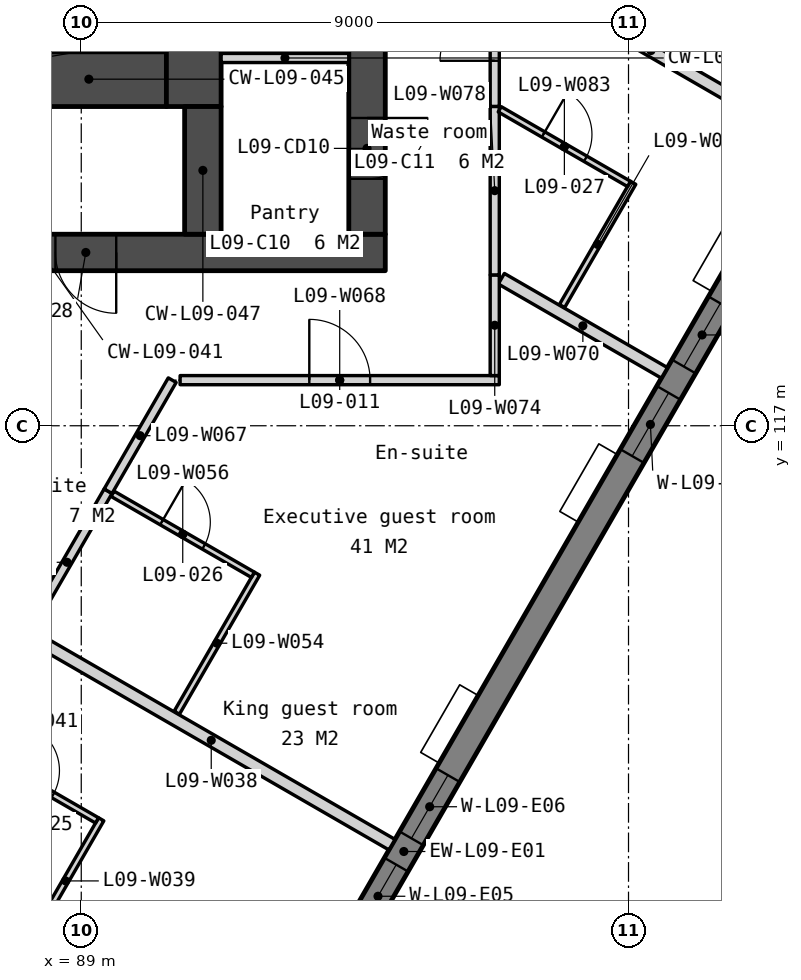
"""IFC4 building model, lengths in metres.
Left out: names, types, materials, properties, quantities, classifications, styles, units other than length and angle.
Written with IfcOpenShell. Run it as: python <this file> out.ifc"""

import sys

from ifc_helpers import new_model, si_unit, direction, frame, frame_2d, origin, place, context, subcontext, project, spatial, polyline, rectangle, outline, extrude, element, fill, save


model = new_model("IFC4")
c1 = context("Model", 3, precision=1e-05, world=origin(), true_north=direction((0.0, 1.0)))
c2 = subcontext(c1, "Body", "Model", "MODEL_VIEW")
j1 = project(units=[si_unit("LENGTHUNIT", "METRE"), si_unit("PLANEANGLEUNIT", "RADIAN")], contexts=[c1])
p1 = place(None, origin())
s1 = spatial("IfcSite", under=j1, at=p1, CompositionType="ELEMENT")
p2 = place(p1, origin())
s2 = spatial("IfcBuilding", under=s1, at=p2, CompositionType="ELEMENT")
p3 = place(p2, frame((0.0, 0.0, 45.5)))
s3 = spatial("IfcBuildingStorey", under=s2, at=p3, CompositionType="ELEMENT", Elevation=45.5)
p4 = place(p3, frame((66.0, 119.85, 0.0), z_axis=(0.0, 0.0, 1.0), x_axis=(1.0, 0.0, 0.0)))
e1 = element("IfcWall", 1, at=p4, inside=s3, PredefinedType="SOLIDWALL", context=c2, shape_type="SweptSolid", body=[
    extrude(rectangle(XDim=28.0, YDim=0.6, at=frame_2d((14.0, 0.0))), origin(), (0.0, 0.0, 1.0), 3.35),
])
p5 = place(p4, frame((6.825, 0.0, 0.0)))
e2 = element("IfcOpeningElement", 2, at=p5, cuts=e1, PredefinedType="OPENING", context=c2, shape_type="SweptSolid", body=[
    extrude(rectangle(XDim=1.8, YDim=2.1, at=frame_2d((0.9, 1.05))), frame((0.0, 0.31, 0.0), z_axis=(0.0, -1.0, 0.0), x_axis=(1.0, 0.0, 0.0)), (0.0, 0.0, 1.0), 0.62),
])
p6 = place(p4, frame((15.85, 0.0, 0.0)))
e3 = element("IfcOpeningElement", 3, at=p6, cuts=e1, PredefinedType="OPENING", context=c2, shape_type="SweptSolid", body=[
    extrude(rectangle(XDim=1.5, YDim=2.1, at=frame_2d((0.75, 1.05))), frame((0.0, 0.31, 0.0), z_axis=(0.0, -1.0, 0.0), x_axis=(1.0, 0.0, 0.0)), (0.0, 0.0, 1.0), 0.62),
])
p7 = place(p4, frame((19.375, 0.0, 0.0)))
e4 = element("IfcOpeningElement", 4, at=p7, cuts=e1, PredefinedType="OPENING", context=c2, shape_type="SweptSolid", body=[
    extrude(rectangle(XDim=1.8, YDim=2.1, at=frame_2d((0.9, 1.05))), frame((0.0, 0.31, 0.0), z_axis=(0.0, -1.0, 0.0), x_axis=(1.0, 0.0, 0.0)), (0.0, 0.0, 1.0), 0.62),
])
p8 = place(p4, frame((4.425, 0.0, 0.0)))
e5 = element("IfcOpeningElement", 5, at=p8, cuts=e1, PredefinedType="OPENING", context=c2, shape_type="SweptSolid", body=[
    extrude(rectangle(XDim=1.0, YDim=2.1, at=frame_2d((0.5, 1.05))), frame((0.0, 0.31, 0.0), z_axis=(0.0, -1.0, 0.0), x_axis=(1.0, 0.0, 0.0)), (0.0, 0.0, 1.0), 0.62),
])
p9 = place(p4, frame((9.783, 0.0, 0.0)))
e6 = element("IfcOpeningElement", 6, at=p9, cuts=e1, PredefinedType="OPENING", context=c2, shape_type="SweptSolid", body=[
    extrude(rectangle(XDim=1.0, YDim=2.1, at=frame_2d((0.5, 1.05))), frame((0.0, 0.31, 0.0), z_axis=(0.0, -1.0, 0.0), x_axis=(1.0, 0.0, 0.0)), (0.0, 0.0, 1.0), 0.62),
])
p10 = place(p4, frame((11.525, 0.0, 0.0)))
e7 = element("IfcOpeningElement", 7, at=p10, cuts=e1, PredefinedType="OPENING", context=c2, shape_type="SweptSolid", body=[
    extrude(rectangle(XDim=1.0, YDim=2.1, at=frame_2d((0.5, 1.05))), frame((0.0, 0.31, 0.0), z_axis=(0.0, -1.0, 0.0), x_axis=(1.0, 0.0, 0.0)), (0.0, 0.0, 1.0), 0.62),
])
p11 = place(p4, frame((13.658, 0.0, 0.0)))
e8 = element("IfcOpeningElement", 8, at=p11, cuts=e1, PredefinedType="OPENING", context=c2, shape_type="SweptSolid", body=[
    extrude(rectangle(XDim=1.0, YDim=2.1, at=frame_2d((0.5, 1.05))), frame((0.0, 0.31, 0.0), z_axis=(0.0, -1.0, 0.0), x_axis=(1.0, 0.0, 0.0)), (0.0, 0.0, 1.0), 0.62),
])
p12 = place(p4, frame((22.575, 0.0, 0.0)))
e9 = element("IfcOpeningElement", 9, at=p12, cuts=e1, PredefinedType="OPENING", context=c2, shape_type="SweptSolid", body=[
    extrude(rectangle(XDim=1.0, YDim=2.1, at=frame_2d((0.5, 1.05))), frame((0.0, 0.31, 0.0), z_axis=(0.0, -1.0, 0.0), x_axis=(1.0, 0.0, 0.0)), (0.0, 0.0, 1.0), 0.62),
])
p13 = place(p3, frame((87.85, 122.7, 0.0), z_axis=(0.0, 0.0, 1.0), x_axis=(1.0, 0.0, 0.0)))
e10 = element("IfcWall", 10, at=p13, inside=s3, PredefinedType="SOLIDWALL", context=c2, shape_type="SweptSolid", body=[
    extrude(rectangle(XDim=2.55, YDim=0.9, at=frame_2d((1.275, 0.0))), origin(), (0.0, 0.0, 1.0), 3.35),
])
p14 = place(p3, frame((90.85, 133.95, 0.0), z_axis=(0.0, 0.0, 1.0), x_axis=(0.0, -1.0, 0.0)))
e11 = element("IfcWall", 11, at=p14, inside=s3, PredefinedType="SOLIDWALL", context=c2, shape_type="SweptSolid", body=[
    extrude(rectangle(XDim=11.7, YDim=0.9, at=frame_2d((5.85, 0.0))), origin(), (0.0, 0.0, 1.0), 3.35),
])
p15 = place(p3, frame((91.0, 122.25, 0.0), z_axis=(0.0, 0.0, 1.0), x_axis=(0.0, -1.0, 0.0)))
e12 = element("IfcWall", 12, at=p15, inside=s3, PredefinedType="SOLIDWALL", context=c2, shape_type="SweptSolid", body=[
    extrude(rectangle(XDim=2.1, YDim=0.6, at=frame_2d((1.05, 0.0))), origin(), (0.0, 0.0, 1.0), 3.35),
])
p16 = place(p3, frame((91.3, 123.049, 0.0), z_axis=(0.0, 0.0, 1.0), x_axis=(1.0, 0.0, 0.0)))
e13 = element("IfcWall", 13, at=p16, inside=s3, PredefinedType="PARTITIONING", context=c2, shape_type="SweptSolid", body=[
    extrude(rectangle(XDim=2.1, YDim=0.15, at=frame_2d((1.05, 0.0))), origin(), (0.0, 0.0, 1.0), 3.35),
])
p17 = place(p3, frame((93.7, 133.95, 0.0), z_axis=(0.0, 0.0, 1.0), x_axis=(0.0, -1.0, 0.0)))
e14 = element("IfcWall", 14, at=p17, inside=s3, PredefinedType="SOLIDWALL", context=c2, shape_type="SweptSolid", body=[
    extrude(rectangle(XDim=13.8, YDim=0.6, at=frame_2d((6.9, 0.0))), origin(), (0.0, 0.0, 1.0), 3.35),
])
p18 = place(p17, frame((0.6, 0.0, 0.0)))
e15 = element("IfcOpeningElement", 15, at=p18, cuts=e14, PredefinedType="OPENING", context=c2, shape_type="SweptSolid", body=[
    extrude(rectangle(XDim=1.1, YDim=2.1, at=frame_2d((0.55, 1.05))), frame((0.0, 0.31, 0.0), z_axis=(0.0, -1.0, 0.0), x_axis=(1.0, 0.0, 0.0)), (0.0, 0.0, 1.0), 0.62),
])
p19 = place(p17, frame((8.963, 0.0, 0.0)))
e16 = element("IfcOpeningElement", 16, at=p19, cuts=e14, PredefinedType="OPENING", context=c2, shape_type="SweptSolid", body=[
    extrude(rectangle(XDim=1.0, YDim=2.1, at=frame_2d((0.5, 1.05))), frame((0.0, 0.31, 0.0), z_axis=(0.0, -1.0, 0.0), x_axis=(1.0, 0.0, 0.0)), (0.0, 0.0, 1.0), 0.62),
])
p20 = place(p17, frame((11.888, 0.0, 0.0)))
e17 = element("IfcOpeningElement", 17, at=p20, cuts=e14, PredefinedType="OPENING", context=c2, shape_type="SweptSolid", body=[
    extrude(rectangle(XDim=1.0, YDim=2.1, at=frame_2d((0.5, 1.05))), frame((0.0, 0.31, 0.0), z_axis=(0.0, -1.0, 0.0), x_axis=(1.0, 0.0, 0.0)), (0.0, 0.0, 1.0), 0.62),
])
p21 = place(p3, frame((83.105, 90.599, -0.15), z_axis=(0.0, 0.0, 1.0), x_axis=(0.499999201451, 0.866025864826, 0.0)))
e18 = element("IfcWall", 18, at=p21, inside=s3, PredefinedType="SOLIDWALL", context=c2, shape_type="SweptSolid", body=[
    extrude(outline(polyline([(44.8, 0.0), (44.8, 3.5), (0.0, 3.5), (0.0, 0.0), (44.8, 0.0)])), frame((0.0, 0.225, 0.0), z_axis=(0.0, -1.0, 0.0), x_axis=(1.0, 0.0, 0.0)), (0.0, 0.0, 1.0), 0.45),
])
p22 = place(p21, frame((3.03, 0.0, 1.05)))
e19 = element("IfcOpeningElement", 19, at=p22, cuts=e18, PredefinedType="OPENING", context=c2, shape_type="SweptSolid", body=[
    extrude(rectangle(XDim=1.2, YDim=1.5, at=frame_2d((0.6, 0.75))), frame((0.0, 0.235, 0.0), z_axis=(0.0, -1.0, 0.0), x_axis=(1.0, 0.0, 0.0)), (0.0, 0.0, 1.0), 0.47),
])
p23 = place(p21, frame((4.73, 0.0, 1.05)))
e20 = element("IfcOpeningElement", 20, at=p23, cuts=e18, PredefinedType="OPENING", context=c2, shape_type="SweptSolid", body=[
    extrude(rectangle(XDim=1.2, YDim=1.5, at=frame_2d((0.6, 0.75))), frame((0.0, 0.235, 0.0), z_axis=(0.0, -1.0, 0.0), x_axis=(1.0, 0.0, 0.0)), (0.0, 0.0, 1.0), 0.47),
])
p24 = place(p21, frame((11.99, 0.0, 1.05)))
e21 = element("IfcOpeningElement", 21, at=p24, cuts=e18, PredefinedType="OPENING", context=c2, shape_type="SweptSolid", body=[
    extrude(rectangle(XDim=1.2, YDim=1.5, at=frame_2d((0.6, 0.75))), frame((0.0, 0.235, 0.0), z_axis=(0.0, -1.0, 0.0), x_axis=(1.0, 0.0, 0.0)), (0.0, 0.0, 1.0), 0.47),
])
p25 = place(p21, frame((13.69, 0.0, 1.05)))
e22 = element("IfcOpeningElement", 22, at=p25, cuts=e18, PredefinedType="OPENING", context=c2, shape_type="SweptSolid", body=[
    extrude(rectangle(XDim=1.2, YDim=1.5, at=frame_2d((0.6, 0.75))), frame((0.0, 0.235, 0.0), z_axis=(0.0, -1.0, 0.0), x_axis=(1.0, 0.0, 0.0)), (0.0, 0.0, 1.0), 0.47),
])
p26 = place(p21, frame((20.95, 0.0, 1.05)))
e23 = element("IfcOpeningElement", 23, at=p26, cuts=e18, PredefinedType="OPENING", context=c2, shape_type="SweptSolid", body=[
    extrude(rectangle(XDim=1.2, YDim=1.5, at=frame_2d((0.6, 0.75))), frame((0.0, 0.235, 0.0), z_axis=(0.0, -1.0, 0.0), x_axis=(1.0, 0.0, 0.0)), (0.0, 0.0, 1.0), 0.47),
])
p27 = place(p21, frame((22.65, 0.0, 1.05)))
e24 = element("IfcOpeningElement", 24, at=p27, cuts=e18, PredefinedType="OPENING", context=c2, shape_type="SweptSolid", body=[
    extrude(rectangle(XDim=1.2, YDim=1.5, at=frame_2d((0.6, 0.75))), frame((0.0, 0.235, 0.0), z_axis=(0.0, -1.0, 0.0), x_axis=(1.0, 0.0, 0.0)), (0.0, 0.0, 1.0), 0.47),
])
p28 = place(p21, frame((29.91, 0.0, 1.05)))
e25 = element("IfcOpeningElement", 25, at=p28, cuts=e18, PredefinedType="OPENING", context=c2, shape_type="SweptSolid", body=[
    extrude(rectangle(XDim=1.2, YDim=1.5, at=frame_2d((0.6, 0.75))), frame((0.0, 0.235, 0.0), z_axis=(0.0, -1.0, 0.0), x_axis=(1.0, 0.0, 0.0)), (0.0, 0.0, 1.0), 0.47),
])
p29 = place(p21, frame((31.61, 0.0, 1.05)))
e26 = element("IfcOpeningElement", 26, at=p29, cuts=e18, PredefinedType="OPENING", context=c2, shape_type="SweptSolid", body=[
    extrude(rectangle(XDim=1.2, YDim=1.5, at=frame_2d((0.6, 0.75))), frame((0.0, 0.235, 0.0), z_axis=(0.0, -1.0, 0.0), x_axis=(1.0, 0.0, 0.0)), (0.0, 0.0, 1.0), 0.47),
])
p30 = place(p21, frame((38.87, 0.0, 1.05)))
e27 = element("IfcOpeningElement", 27, at=p30, cuts=e18, PredefinedType="OPENING", context=c2, shape_type="SweptSolid", body=[
    extrude(rectangle(XDim=1.2, YDim=1.5, at=frame_2d((0.6, 0.75))), frame((0.0, 0.235, 0.0), z_axis=(0.0, -1.0, 0.0), x_axis=(1.0, 0.0, 0.0)), (0.0, 0.0, 1.0), 0.47),
])
p31 = place(p21, frame((40.57, 0.0, 1.05)))
e28 = element("IfcOpeningElement", 28, at=p31, cuts=e18, PredefinedType="OPENING", context=c2, shape_type="SweptSolid", body=[
    extrude(rectangle(XDim=1.2, YDim=1.5, at=frame_2d((0.6, 0.75))), frame((0.0, 0.235, 0.0), z_axis=(0.0, -1.0, 0.0), x_axis=(1.0, 0.0, 0.0)), (0.0, 0.0, 1.0), 0.47),
])
p32 = place(p3, frame((88.165, 113.543, 0.0), z_axis=(0.0, 0.0, 1.0), x_axis=(0.86603516302, -0.499983096127, 0.0)))
e29 = element("IfcWall", 29, at=p32, inside=s3, PredefinedType="PARTITIONING", context=c2, shape_type="SweptSolid", body=[
    extrude(rectangle(XDim=6.865, YDim=0.2, at=frame_2d((3.433, 0.0))), origin(), (0.0, 0.0, 1.0), 3.35),
])
p33 = place(p3, frame((88.158, 108.501, 0.0), z_axis=(0.0, 0.0, 1.0), x_axis=(0.500032503492, 0.866006637072, 0.0)))
e30 = element("IfcWall", 30, at=p33, inside=s3, PredefinedType="PARTITIONING", context=c2, shape_type="SweptSolid", body=[
    extrude(rectangle(XDim=2.34, YDim=0.1, at=frame_2d((1.17, 0.0))), origin(), (0.0, 0.0, 1.0), 3.35),
])
p34 = place(p3, frame((87.116, 111.746, 0.0), z_axis=(0.0, 0.0, 1.0), x_axis=(0.86604923931, -0.499958713387, 0.0)))
e31 = element("IfcWall", 31, at=p34, inside=s3, PredefinedType="PARTITIONING", context=c2, shape_type="SweptSolid", body=[
    extrude(rectangle(XDim=2.475, YDim=0.1, at=frame_2d((1.237, 0.0))), origin(), (0.0, 0.0, 1.0), 3.35),
])
p35 = place(p34, frame((0.837, 0.0, 0.0)))
e32 = element("IfcOpeningElement", 32, at=p35, cuts=e31, PredefinedType="OPENING", context=c2, shape_type="SweptSolid", body=[
    extrude(rectangle(XDim=0.8, YDim=2.1, at=frame_2d((0.4, 1.05))), frame((0.0, 0.06, 0.0), z_axis=(0.0, -1.0, 0.0), x_axis=(1.0, 0.0, 0.0)), (0.0, 0.0, 1.0), 0.12),
])
p36 = place(p3, frame((88.091, 113.585, 0.0), z_axis=(0.0, 0.0, 1.0), x_axis=(0.50000943426, 0.866019956843, 0.0)))
e33 = element("IfcWall", 33, at=p36, inside=s3, PredefinedType="PARTITIONING", context=c2, shape_type="SweptSolid", body=[
    extrude(rectangle(XDim=2.7, YDim=0.15, at=frame_2d((1.35, 0.0))), origin(), (0.0, 0.0, 1.0), 3.35),
])
p37 = place(p3, frame((90.571, 112.281, 0.0), z_axis=(0.0, 0.0, 1.0), x_axis=(0.500007957085, 0.86602080971, 0.0)))
e34 = element("IfcWall", 34, at=p37, inside=s3, PredefinedType="PARTITIONING", context=c2, shape_type="SweptSolid", body=[
    extrude(rectangle(XDim=2.64, YDim=0.1, at=frame_2d((1.32, 0.0))), origin(), (0.0, 0.0, 1.0), 3.35),
])
p38 = place(p3, frame((89.515, 115.881, 0.0), z_axis=(0.0, 0.0, 1.0), x_axis=(0.86601318911, -0.500021155841, 0.0)))
e35 = element("IfcWall", 35, at=p38, inside=s3, PredefinedType="PARTITIONING", context=c2, shape_type="SweptSolid", body=[
    extrude(rectangle(XDim=2.665, YDim=0.1, at=frame_2d((1.333, 0.0))), origin(), (0.0, 0.0, 1.0), 3.35),
])
p39 = place(p38, frame((0.933, 0.0, 0.0)))
e36 = element("IfcOpeningElement", 36, at=p39, cuts=e35, PredefinedType="OPENING", context=c2, shape_type="SweptSolid", body=[
    extrude(rectangle(XDim=0.8, YDim=2.1, at=frame_2d((0.4, 1.05))), frame((0.0, 0.06, 0.0), z_axis=(0.0, -1.0, 0.0), x_axis=(1.0, 0.0, 0.0)), (0.0, 0.0, 1.0), 0.12),
])
p40 = place(p3, frame((89.441, 115.924, 0.0), z_axis=(0.0, 0.0, 1.0), x_axis=(0.499986337096, 0.866033291922, 0.0)))
e37 = element("IfcWall", 37, at=p40, inside=s3, PredefinedType="PARTITIONING", context=c2, shape_type="SweptSolid", body=[
    extrude(rectangle(XDim=2.109, YDim=0.15, at=frame_2d((1.054, 0.0))), origin(), (0.0, 0.0, 1.0), 3.35),
])
p41 = place(p3, frame((90.626, 117.75, 0.0), z_axis=(0.0, 0.0, 1.0), x_axis=(1.0, 0.0, 0.0)))
e38 = element("IfcWall", 38, at=p41, inside=s3, PredefinedType="PARTITIONING", context=c2, shape_type="SweptSolid", body=[
    extrude(rectangle(XDim=5.249, YDim=0.15, at=frame_2d((2.625, 0.0))), origin(), (0.0, 0.0, 1.0), 3.35),
])
p42 = place(p41, frame((2.125, 0.0, 0.0)))
e39 = element("IfcOpeningElement", 39, at=p42, cuts=e38, PredefinedType="OPENING", context=c2, shape_type="SweptSolid", body=[
    extrude(rectangle(XDim=1.0, YDim=2.1, at=frame_2d((0.5, 1.05))), frame((0.0, 0.085, 0.0), z_axis=(0.0, -1.0, 0.0), x_axis=(1.0, 0.0, 0.0)), (0.0, 0.0, 1.0), 0.17),
])
p43 = place(p3, frame((95.908, 119.418, 0.0), z_axis=(0.0, 0.0, 1.0), x_axis=(0.866051688794, -0.499954470265, 0.0)))
e40 = element("IfcWall", 40, at=p43, inside=s3, PredefinedType="PARTITIONING", context=c2, shape_type="SweptSolid", body=[
    extrude(rectangle(XDim=3.097, YDim=0.2, at=frame_2d((1.548, 0.0))), origin(), (0.0, 0.0, 1.0), 3.35),
])
p44 = place(p3, frame((95.8, 117.825, 0.0), z_axis=(0.0, 0.0, 1.0), x_axis=(0.0, 1.0, 0.0)))
e41 = element("IfcWall", 41, at=p44, inside=s3, PredefinedType="PARTITIONING", context=c2, shape_type="SweptSolid", body=[
    extrude(rectangle(XDim=1.656, YDim=0.15, at=frame_2d((0.828, 0.0))), origin(), (0.0, 0.0, 1.0), 3.35),
])
p45 = place(p3, frame((95.8, 119.481, 0.0), z_axis=(0.0, 0.0, 1.0), x_axis=(0.0, 1.0, 0.0)))
e42 = element("IfcWall", 42, at=p45, inside=s3, PredefinedType="PARTITIONING", context=c2, shape_type="SweptSolid", body=[
    extrude(rectangle(XDim=2.771, YDim=0.15, at=frame_2d((1.386, 0.0))), origin(), (0.0, 0.0, 1.0), 3.35),
])
p46 = place(p3, frame((96.907, 118.969, 0.0), z_axis=(0.0, 0.0, 1.0), x_axis=(0.499999433879, 0.866025730634, 0.0)))
e43 = element("IfcWall", 43, at=p46, inside=s3, PredefinedType="PARTITIONING", context=c2, shape_type="SweptSolid", body=[
    extrude(rectangle(XDim=2.34, YDim=0.1, at=frame_2d((1.17, 0.0))), origin(), (0.0, 0.0, 1.0), 2.887),
])
p47 = place(p3, frame((95.882, 122.205, 0.0), z_axis=(0.0, 0.0, 1.0), x_axis=(0.866006720078, -0.500032359733, 0.0)))
e44 = element("IfcWall", 44, at=p47, inside=s3, PredefinedType="PARTITIONING", context=c2, shape_type="SweptSolid", body=[
    extrude(rectangle(XDim=2.455, YDim=0.1, at=frame_2d((1.228, 0.0))), origin(), (0.0, 0.0, 1.0), 3.35),
])
p48 = place(p47, frame((0.827, 0.0, 0.0)))
e45 = element("IfcOpeningElement", 45, at=p48, cuts=e44, PredefinedType="OPENING", context=c2, shape_type="SweptSolid", body=[
    extrude(rectangle(XDim=0.8, YDim=2.1, at=frame_2d((0.4, 1.05))), frame((0.0, 0.06, 0.0), z_axis=(0.0, -1.0, 0.0), x_axis=(1.0, 0.0, 0.0)), (0.0, 0.0, 1.0), 0.12),
])
p49 = place(p3, frame((95.908, 124.591, 0.0), z_axis=(0.0, 0.0, 1.0), x_axis=(0.866043237112, -0.499969110498, 0.0)))
e46 = element("IfcWall", 46, at=p49, inside=s3, PredefinedType="PARTITIONING", context=c2, shape_type="SweptSolid", body=[
    extrude(rectangle(XDim=5.683, YDim=0.2, at=frame_2d((2.842, 0.0))), origin(), (0.0, 0.0, 1.0), 3.35),
])
p50 = place(p3, frame((95.8, 122.252, 0.0), z_axis=(0.0, 0.0, 1.0), x_axis=(0.0, 1.0, 0.0)))
e47 = element("IfcWall", 47, at=p50, inside=s3, PredefinedType="PARTITIONING", context=c2, shape_type="SweptSolid", body=[
    extrude(rectangle(XDim=2.402, YDim=0.15, at=frame_2d((1.201, 0.0))), origin(), (0.0, 0.0, 1.0), 3.35),
])
p51 = place(p50, frame((0.751, 0.0, 0.0)))
e48 = element("IfcOpeningElement", 48, at=p51, cuts=e47, PredefinedType="OPENING", context=c2, shape_type="SweptSolid", body=[
    extrude(rectangle(XDim=0.9, YDim=2.1, at=frame_2d((0.45, 1.05))), frame((0.0, 0.085, 0.0), z_axis=(0.0, -1.0, 0.0), x_axis=(1.0, 0.0, 0.0)), (0.0, 0.0, 1.0), 0.17),
])
p52 = place(p20, origin())
e49 = element("IfcDoor", 49, at=p52, inside=s3, OperationType="SINGLE_SWING_LEFT", PredefinedType="DOOR", context=c2, shape_type="SweptSolid", body=[
    extrude(rectangle(XDim=1.0, YDim=2.1, at=frame_2d((0.5, 1.05))), frame((0.0, 0.025, 0.0), z_axis=(0.0, -1.0, 0.0), x_axis=(1.0, 0.0, 0.0)), (0.0, 0.0, 1.0), 0.05),
])
fill(e17, e49)
p53 = place(p12, origin())
e50 = element("IfcDoor", 50, at=p53, inside=s3, OperationType="SINGLE_SWING_RIGHT", PredefinedType="DOOR", context=c2, shape_type="SweptSolid", body=[
    extrude(rectangle(XDim=1.0, YDim=2.1, at=frame_2d((0.5, 1.05))), frame((0.0, 0.025, 0.0), z_axis=(0.0, -1.0, 0.0), x_axis=(1.0, 0.0, 0.0)), (0.0, 0.0, 1.0), 0.05),
])
fill(e9, e50)
p54 = place(p26, origin())
e51 = element("IfcWindow", 51, at=p54, inside=s3, PartitioningType="SINGLE_PANEL", PredefinedType="WINDOW", context=c2, shape_type="SweptSolid", body=[
    extrude(rectangle(XDim=1.2, YDim=1.5, at=frame_2d((0.6, 0.75))), frame((0.0, 0.03, 0.0), z_axis=(0.0, -1.0, 0.0), x_axis=(1.0, 0.0, 0.0)), (0.0, 0.0, 1.0), 0.06),
])
fill(e23, e51)
p55 = place(p27, origin())
e52 = element("IfcWindow", 52, at=p55, inside=s3, PartitioningType="SINGLE_PANEL", PredefinedType="WINDOW", context=c2, shape_type="SweptSolid", body=[
    extrude(rectangle(XDim=1.2, YDim=1.5, at=frame_2d((0.6, 0.75))), frame((0.0, 0.03, 0.0), z_axis=(0.0, -1.0, 0.0), x_axis=(1.0, 0.0, 0.0)), (0.0, 0.0, 1.0), 0.06),
])
fill(e24, e52)
p56 = place(p28, origin())
e53 = element("IfcWindow", 53, at=p56, inside=s3, PartitioningType="SINGLE_PANEL", PredefinedType="WINDOW", context=c2, shape_type="SweptSolid", body=[
    extrude(rectangle(XDim=1.2, YDim=1.5, at=frame_2d((0.6, 0.75))), frame((0.0, 0.03, 0.0), z_axis=(0.0, -1.0, 0.0), x_axis=(1.0, 0.0, 0.0)), (0.0, 0.0, 1.0), 0.06),
])
fill(e25, e53)
p57 = place(p29, origin())
e54 = element("IfcWindow", 54, at=p57, inside=s3, PartitioningType="SINGLE_PANEL", PredefinedType="WINDOW", context=c2, shape_type="SweptSolid", body=[
    extrude(rectangle(XDim=1.2, YDim=1.5, at=frame_2d((0.6, 0.75))), frame((0.0, 0.03, 0.0), z_axis=(0.0, -1.0, 0.0), x_axis=(1.0, 0.0, 0.0)), (0.0, 0.0, 1.0), 0.06),
])
fill(e26, e54)
p58 = place(p42, origin())
e55 = element("IfcDoor", 55, at=p58, inside=s3, OperationType="SINGLE_SWING_LEFT", PredefinedType="DOOR", context=c2, shape_type="SweptSolid", body=[
    extrude(rectangle(XDim=1.0, YDim=2.1, at=frame_2d((0.5, 1.05))), frame((0.0, 0.025, 0.0), z_axis=(0.0, -1.0, 0.0), x_axis=(1.0, 0.0, 0.0)), (0.0, 0.0, 1.0), 0.05),
])
fill(e39, e55)
p59 = place(p51, origin())
e56 = element("IfcDoor", 56, at=p59, inside=s3, OperationType="SINGLE_SWING_LEFT", PredefinedType="DOOR", context=c2, shape_type="SweptSolid", body=[
    extrude(rectangle(XDim=0.9, YDim=2.1, at=frame_2d((0.45, 1.05))), frame((0.0, 0.025, 0.0), z_axis=(0.0, -1.0, 0.0), x_axis=(1.0, 0.0, 0.0)), (0.0, 0.0, 1.0), 0.05),
])
fill(e48, e56)
p60 = place(p35, origin())
e57 = element("IfcDoor", 57, at=p60, inside=s3, OperationType="SINGLE_SWING_LEFT", PredefinedType="DOOR", context=c2, shape_type="SweptSolid", body=[
    extrude(rectangle(XDim=0.8, YDim=2.1, at=frame_2d((0.4, 1.05))), frame((0.0, 0.025, 0.0), z_axis=(0.0, -1.0, 0.0), x_axis=(1.0, 0.0, 0.0)), (0.0, 0.0, 1.0), 0.05),
])
fill(e32, e57)
p61 = place(p39, origin())
e58 = element("IfcDoor", 58, at=p61, inside=s3, OperationType="SINGLE_SWING_LEFT", PredefinedType="DOOR", context=c2, shape_type="SweptSolid", body=[
    extrude(rectangle(XDim=0.8, YDim=2.1, at=frame_2d((0.4, 1.05))), frame((0.0, 0.025, 0.0), z_axis=(0.0, -1.0, 0.0), x_axis=(1.0, 0.0, 0.0)), (0.0, 0.0, 1.0), 0.05),
])
fill(e36, e58)
p62 = place(p48, origin())
e59 = element("IfcDoor", 59, at=p62, inside=s3, OperationType="SINGLE_SWING_LEFT", PredefinedType="DOOR", context=c2, shape_type="SweptSolid", body=[
    extrude(rectangle(XDim=0.8, YDim=2.1, at=frame_2d((0.4, 1.05))), frame((0.0, 0.025, 0.0), z_axis=(0.0, -1.0, 0.0), x_axis=(1.0, 0.0, 0.0)), (0.0, 0.0, 1.0), 0.05),
])
fill(e45, e59)
save(model, sys.argv[1])
